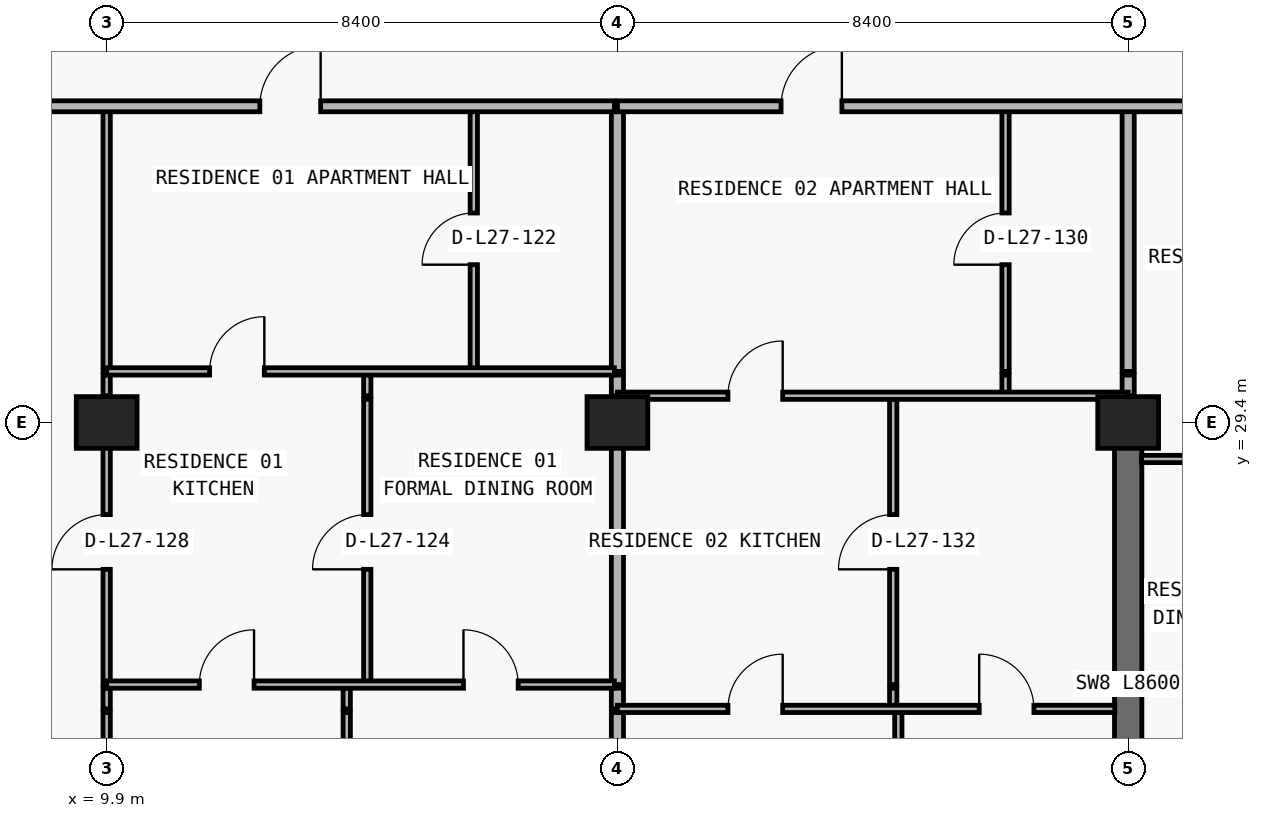
"""IFC4 building model, lengths in metres.
Left out: names, types, materials, properties, quantities, classifications, styles, units other than length and angle.
Written with IfcOpenShell. Run it as: python <this file> out.ifc"""

import sys

from ifc_helpers import new_model, si_unit, direction, frame, frame_2d, origin, origin_2d, place, context, subcontext, project, spatial, rectangle, extrude, element, fill, save


model = new_model("IFC4")
c1 = context("Model", 3, precision=1e-05, world=origin(), true_north=direction((0.0, 1.0)))
c2 = subcontext(c1, "Body", "Model", "MODEL_VIEW")
j1 = project(units=[si_unit("LENGTHUNIT", "METRE"), si_unit("PLANEANGLEUNIT", "RADIAN")], contexts=[c1])
p1 = place(None, origin())
s1 = spatial("IfcSite", under=j1, at=p1, CompositionType="ELEMENT")
p2 = place(p1, origin())
s2 = spatial("IfcBuilding", under=s1, at=p2, CompositionType="ELEMENT")
p3 = place(p2, frame((0.0, 0.0, 102.6)))
s3 = spatial("IfcBuildingStorey", under=s2, at=p3, CompositionType="ELEMENT", Elevation=102.6)
for number, where, z_axis, x_axis in (
    (1, (9.9, 29.4, 0.0), (0.0, 0.0, 1.0), (1.0, 0.0, 0.0)),
    (2, (18.3, 29.4, 0.0), (0.0, 0.0, 1.0), (1.0, 0.0, 0.0)),
    (3, (26.7, 29.4, 0.0), (0.0, 0.0, 1.0), (1.0, 0.0, 0.0)),
):
    element("IfcColumn", number, at=place(p3, frame(where, z_axis=z_axis, x_axis=x_axis)), inside=s3, PredefinedType="COLUMN", context=c2, shape_type="SweptSolid", body=[
        extrude(rectangle(XDim=1.0, YDim=0.85, at=origin_2d()), origin(), (0.0, 0.0, 1.0), 3.05),
    ])
p4 = place(p3, frame((26.7, 20.8, 0.0), z_axis=(0.0, 0.0, 1.0), x_axis=(0.0, 1.0, 0.0)))
e4 = element("IfcWall", 4, at=p4, inside=s3, PredefinedType="SHEAR", context=c2, shape_type="SweptSolid", body=[
    extrude(rectangle(XDim=8.6, YDim=0.45, at=frame_2d((4.3, 0.0))), origin(), (0.0, 0.0, 1.0), 3.05),
])
p5 = place(p3, frame((9.9, 8.84, 0.0), z_axis=(0.0, 0.0, 1.0), x_axis=(0.0, 1.0, 0.0)))
e5 = element("IfcWall", 5, at=p5, inside=s3, PredefinedType="PARTITIONING", context=c2, shape_type="SweptSolid", body=[
    extrude(rectangle(XDim=15.79, YDim=0.12, at=frame_2d((7.895, 0.0))), origin(), (0.0, 0.0, 1.0), 2.174),
])
p6 = place(p3, frame((9.9, 24.69, 0.0), z_axis=(0.0, 0.0, 1.0), x_axis=(0.0, 1.0, 0.0)))
e6 = element("IfcWall", 6, at=p6, inside=s3, PredefinedType="PARTITIONING", context=c2, shape_type="SweptSolid", body=[
    extrude(rectangle(XDim=0.34, YDim=0.12, at=frame_2d((0.17, 0.0))), origin(), (0.0, 0.0, 1.0), 2.174),
])
p7 = place(p3, frame((9.9, 25.09, 0.0), z_axis=(0.0, 0.0, 1.0), x_axis=(0.0, 1.0, 0.0)))
e7 = element("IfcWall", 7, at=p7, inside=s3, PredefinedType="PARTITIONING", context=c2, shape_type="SweptSolid", body=[
    extrude(rectangle(XDim=4.69, YDim=0.12, at=frame_2d((2.345, 0.0))), origin(), (0.0, 0.0, 1.0), 2.174),
])
p8 = place(p7, frame((1.895, 0.0, 0.0)))
e8 = element("IfcOpeningElement", 8, at=p8, cuts=e7, PredefinedType="OPENING", context=c2, shape_type="SweptSolid", body=[
    extrude(rectangle(XDim=0.9, YDim=2.124, at=frame_2d((0.45, 1.062))), frame((0.0, 0.07, 0.0), z_axis=(0.0, -1.0, 0.0), x_axis=(1.0, 0.0, 0.0)), (0.0, 0.0, 1.0), 0.14),
])
p9 = place(p3, frame((9.9, 29.84, 0.0), z_axis=(0.0, 0.0, 1.0), x_axis=(0.0, 1.0, 0.0)))
e9 = element("IfcWall", 9, at=p9, inside=s3, PredefinedType="PARTITIONING", context=c2, shape_type="SweptSolid", body=[
    extrude(rectangle(XDim=0.34, YDim=0.12, at=frame_2d((0.17, 0.0))), origin(), (0.0, 0.0, 1.0), 2.174),
])
p10 = place(p3, frame((9.9, 30.24, 0.0), z_axis=(0.0, 0.0, 1.0), x_axis=(0.0, 1.0, 0.0)))
e10 = element("IfcWall", 10, at=p10, inside=s3, PredefinedType="PARTITIONING", context=c2, shape_type="SweptSolid", body=[
    extrude(rectangle(XDim=4.36, YDim=0.12, at=frame_2d((2.18, 0.0))), origin(), (0.0, 0.0, 1.0), 2.174),
])
p11 = place(p3, frame((13.848, 8.84, 0.0), z_axis=(0.0, 0.0, 1.0), x_axis=(0.0, 1.0, 0.0)))
e11 = element("IfcWall", 11, at=p11, inside=s3, PredefinedType="PARTITIONING", context=c2, shape_type="SweptSolid", body=[
    extrude(rectangle(XDim=15.79, YDim=0.12, at=frame_2d((7.895, 0.0))), origin(), (0.0, 0.0, 1.0), 3.05),
])
p12 = place(p3, frame((13.848, 24.69, 0.0), z_axis=(0.0, 0.0, 1.0), x_axis=(0.0, 1.0, 0.0)))
e12 = element("IfcWall", 12, at=p12, inside=s3, PredefinedType="PARTITIONING", context=c2, shape_type="SweptSolid", body=[
    extrude(rectangle(XDim=0.34, YDim=0.12, at=frame_2d((0.17, 0.0))), origin(), (0.0, 0.0, 1.0), 3.05),
])
p13 = place(p3, frame((14.186, 25.09, 0.0), z_axis=(0.0, 0.0, 1.0), x_axis=(0.0, 1.0, 0.0)))
e13 = element("IfcWall", 13, at=p13, inside=s3, PredefinedType="PARTITIONING", context=c2, shape_type="SweptSolid", body=[
    extrude(rectangle(XDim=4.69, YDim=0.12, at=frame_2d((2.345, 0.0))), origin(), (0.0, 0.0, 1.0), 3.05),
])
p14 = place(p13, frame((1.895, 0.0, 0.0)))
e14 = element("IfcOpeningElement", 14, at=p14, cuts=e13, PredefinedType="OPENING", context=c2, shape_type="SweptSolid", body=[
    extrude(rectangle(XDim=0.9, YDim=2.15, at=frame_2d((0.45, 1.075))), frame((0.0, 0.07, 0.0), z_axis=(0.0, -1.0, 0.0), x_axis=(1.0, 0.0, 0.0)), (0.0, 0.0, 1.0), 0.14),
])
p15 = place(p3, frame((14.186, 29.84, 0.0), z_axis=(0.0, 0.0, 1.0), x_axis=(0.0, 1.0, 0.0)))
e15 = element("IfcWall", 15, at=p15, inside=s3, PredefinedType="PARTITIONING", context=c2, shape_type="SweptSolid", body=[
    extrude(rectangle(XDim=0.34, YDim=0.12, at=frame_2d((0.17, 0.0))), origin(), (0.0, 0.0, 1.0), 3.05),
])
p16 = place(p3, frame((15.938, 30.24, 0.0), z_axis=(0.0, 0.0, 1.0), x_axis=(0.0, 1.0, 0.0)))
e16 = element("IfcWall", 16, at=p16, inside=s3, PredefinedType="PARTITIONING", context=c2, shape_type="SweptSolid", body=[
    extrude(rectangle(XDim=4.36, YDim=0.12, at=frame_2d((2.18, 0.0))), origin(), (0.0, 0.0, 1.0), 3.05),
])
p17 = place(p16, frame((1.755, 0.0, 0.0)))
e17 = element("IfcOpeningElement", 17, at=p17, cuts=e16, PredefinedType="OPENING", context=c2, shape_type="SweptSolid", body=[
    extrude(rectangle(XDim=0.85, YDim=2.1, at=frame_2d((0.425, 1.05))), frame((0.0, 0.07, 0.0), z_axis=(0.0, -1.0, 0.0), x_axis=(1.0, 0.0, 0.0)), (0.0, 0.0, 1.0), 0.14),
])
p18 = place(p3, frame((18.3, 8.84, 0.0), z_axis=(0.0, 0.0, 1.0), x_axis=(0.0, 1.0, 0.0)))
e18 = element("IfcWall", 18, at=p18, inside=s3, PredefinedType="PARTITIONING", context=c2, shape_type="SweptSolid", body=[
    extrude(rectangle(XDim=15.79, YDim=0.2, at=frame_2d((7.895, 0.0))), origin(), (0.0, 0.0, 1.0), 2.174),
])
p19 = place(p3, frame((18.3, 24.69, 0.0), z_axis=(0.0, 0.0, 1.0), x_axis=(0.0, 1.0, 0.0)))
e19 = element("IfcWall", 19, at=p19, inside=s3, PredefinedType="PARTITIONING", context=c2, shape_type="SweptSolid", body=[
    extrude(rectangle(XDim=0.34, YDim=0.2, at=frame_2d((0.17, 0.0))), origin(), (0.0, 0.0, 1.0), 2.174),
])
p20 = place(p3, frame((18.3, 25.09, 0.0), z_axis=(0.0, 0.0, 1.0), x_axis=(0.0, 1.0, 0.0)))
e20 = element("IfcWall", 20, at=p20, inside=s3, PredefinedType="PARTITIONING", context=c2, shape_type="SweptSolid", body=[
    extrude(rectangle(XDim=4.69, YDim=0.2, at=frame_2d((2.345, 0.0))), origin(), (0.0, 0.0, 1.0), 2.174),
])
p21 = place(p3, frame((18.3, 29.84, 0.0), z_axis=(0.0, 0.0, 1.0), x_axis=(0.0, 1.0, 0.0)))
e21 = element("IfcWall", 21, at=p21, inside=s3, PredefinedType="PARTITIONING", context=c2, shape_type="SweptSolid", body=[
    extrude(rectangle(XDim=0.34, YDim=0.2, at=frame_2d((0.17, 0.0))), origin(), (0.0, 0.0, 1.0), 2.174),
])
p22 = place(p3, frame((18.3, 30.24, 0.0), z_axis=(0.0, 0.0, 1.0), x_axis=(0.0, 1.0, 0.0)))
e22 = element("IfcWall", 22, at=p22, inside=s3, PredefinedType="PARTITIONING", context=c2, shape_type="SweptSolid", body=[
    extrude(rectangle(XDim=4.36, YDim=0.2, at=frame_2d((2.18, 0.0))), origin(), (0.0, 0.0, 1.0), 2.174),
])
p23 = place(p3, frame((22.836, 24.69, 0.0), z_axis=(0.0, 0.0, 1.0), x_axis=(0.0, 1.0, 0.0)))
e23 = element("IfcWall", 23, at=p23, inside=s3, PredefinedType="PARTITIONING", context=c2, shape_type="SweptSolid", body=[
    extrude(rectangle(XDim=0.34, YDim=0.12, at=frame_2d((0.17, 0.0))), origin(), (0.0, 0.0, 1.0), 3.05),
])
p24 = place(p3, frame((22.836, 25.09, 0.0), z_axis=(0.0, 0.0, 1.0), x_axis=(0.0, 1.0, 0.0)))
e24 = element("IfcWall", 24, at=p24, inside=s3, PredefinedType="PARTITIONING", context=c2, shape_type="SweptSolid", body=[
    extrude(rectangle(XDim=4.69, YDim=0.12, at=frame_2d((2.345, 0.0))), origin(), (0.0, 0.0, 1.0), 3.05),
])
p25 = place(p24, frame((1.895, 0.0, 0.0)))
e25 = element("IfcOpeningElement", 25, at=p25, cuts=e24, PredefinedType="OPENING", context=c2, shape_type="SweptSolid", body=[
    extrude(rectangle(XDim=0.9, YDim=2.15, at=frame_2d((0.45, 1.075))), frame((0.0, 0.07, 0.0), z_axis=(0.0, -1.0, 0.0), x_axis=(1.0, 0.0, 0.0)), (0.0, 0.0, 1.0), 0.14),
])
p26 = place(p3, frame((22.92, 8.84, 0.0), z_axis=(0.0, 0.0, 1.0), x_axis=(0.0, 1.0, 0.0)))
e26 = element("IfcWall", 26, at=p26, inside=s3, PredefinedType="PARTITIONING", context=c2, shape_type="SweptSolid", body=[
    extrude(rectangle(XDim=15.79, YDim=0.12, at=frame_2d((7.895, 0.0))), origin(), (0.0, 0.0, 1.0), 3.05),
])
p27 = place(p3, frame((24.683, 29.84, 0.0), z_axis=(0.0, 0.0, 1.0), x_axis=(0.0, 1.0, 0.0)))
e27 = element("IfcWall", 27, at=p27, inside=s3, PredefinedType="PARTITIONING", context=c2, shape_type="SweptSolid", body=[
    extrude(rectangle(XDim=0.34, YDim=0.12, at=frame_2d((0.17, 0.0))), origin(), (0.0, 0.0, 1.0), 3.05),
])
p28 = place(p3, frame((24.683, 30.24, 0.0), z_axis=(0.0, 0.0, 1.0), x_axis=(0.0, 1.0, 0.0)))
e28 = element("IfcWall", 28, at=p28, inside=s3, PredefinedType="PARTITIONING", context=c2, shape_type="SweptSolid", body=[
    extrude(rectangle(XDim=4.36, YDim=0.12, at=frame_2d((2.18, 0.0))), origin(), (0.0, 0.0, 1.0), 3.05),
])
p29 = place(p28, frame((1.755, 0.0, 0.0)))
e29 = element("IfcOpeningElement", 29, at=p29, cuts=e28, PredefinedType="OPENING", context=c2, shape_type="SweptSolid", body=[
    extrude(rectangle(XDim=0.85, YDim=2.1, at=frame_2d((0.425, 1.05))), frame((0.0, 0.07, 0.0), z_axis=(0.0, -1.0, 0.0), x_axis=(1.0, 0.0, 0.0)), (0.0, 0.0, 1.0), 0.14),
])
p30 = place(p3, frame((26.7, 29.405, 0.0), z_axis=(0.0, 0.0, 1.0), x_axis=(0.0, 1.0, 0.0)))
e30 = element("IfcWall", 30, at=p30, inside=s3, PredefinedType="PARTITIONING", context=c2, shape_type="SweptSolid", body=[
    extrude(rectangle(XDim=0.375, YDim=0.2, at=frame_2d((0.188, 0.0))), origin(), (0.0, 0.0, 1.0), 3.05),
])
p31 = place(p3, frame((26.7, 29.84, 0.0), z_axis=(0.0, 0.0, 1.0), x_axis=(0.0, 1.0, 0.0)))
e31 = element("IfcWall", 31, at=p31, inside=s3, PredefinedType="PARTITIONING", context=c2, shape_type="SweptSolid", body=[
    extrude(rectangle(XDim=0.34, YDim=0.2, at=frame_2d((0.17, 0.0))), origin(), (0.0, 0.0, 1.0), 2.335),
])
p32 = place(p3, frame((26.7, 30.24, 0.0), z_axis=(0.0, 0.0, 1.0), x_axis=(0.0, 1.0, 0.0)))
e32 = element("IfcWall", 32, at=p32, inside=s3, PredefinedType="PARTITIONING", context=c2, shape_type="SweptSolid", body=[
    extrude(rectangle(XDim=4.36, YDim=0.2, at=frame_2d((2.18, 0.0))), origin(), (0.0, 0.0, 1.0), 2.335),
])
p33 = place(p3, frame((18.3, 24.69, 0.0), z_axis=(0.0, 0.0, 1.0), x_axis=(1.0, 0.0, 0.0)))
e33 = element("IfcWall", 33, at=p33, inside=s3, PredefinedType="PARTITIONING", context=c2, shape_type="SweptSolid", body=[
    extrude(rectangle(XDim=8.18, YDim=0.12, at=frame_2d((4.09, 0.0))), origin(), (0.0, 0.0, 1.0), 3.05),
])
p34 = place(p33, frame((1.818, 0.0, 0.0)))
e34 = element("IfcOpeningElement", 34, at=p34, cuts=e33, PredefinedType="OPENING", context=c2, shape_type="SweptSolid", body=[
    extrude(rectangle(XDim=0.9, YDim=2.15, at=frame_2d((0.45, 1.075))), frame((0.0, 0.07, 0.0), z_axis=(0.0, -1.0, 0.0), x_axis=(1.0, 0.0, 0.0)), (0.0, 0.0, 1.0), 0.14),
])
p35 = place(p33, frame((5.95, 0.0, 0.0)))
e35 = element("IfcOpeningElement", 35, at=p35, cuts=e33, PredefinedType="OPENING", context=c2, shape_type="SweptSolid", body=[
    extrude(rectangle(XDim=0.9, YDim=2.15, at=frame_2d((0.45, 1.075))), frame((0.0, 0.07, 0.0), z_axis=(0.0, -1.0, 0.0), x_axis=(1.0, 0.0, 0.0)), (0.0, 0.0, 1.0), 0.14),
])
p36 = place(p3, frame((9.9, 25.09, 0.0), z_axis=(0.0, 0.0, 1.0), x_axis=(1.0, 0.0, 0.0)))
e36 = element("IfcWall", 36, at=p36, inside=s3, PredefinedType="PARTITIONING", context=c2, shape_type="SweptSolid", body=[
    extrude(rectangle(XDim=8.35, YDim=0.12, at=frame_2d((4.175, 0.0))), origin(), (0.0, 0.0, 1.0), 3.05),
])
p37 = place(p36, frame((1.524, 0.0, 0.0)))
e37 = element("IfcOpeningElement", 37, at=p37, cuts=e36, PredefinedType="OPENING", context=c2, shape_type="SweptSolid", body=[
    extrude(rectangle(XDim=0.9, YDim=2.15, at=frame_2d((0.45, 1.075))), frame((0.0, 0.07, 0.0), z_axis=(0.0, -1.0, 0.0), x_axis=(1.0, 0.0, 0.0)), (0.0, 0.0, 1.0), 0.14),
])
p38 = place(p36, frame((5.868, 0.0, 0.0)))
e38 = element("IfcOpeningElement", 38, at=p38, cuts=e36, PredefinedType="OPENING", context=c2, shape_type="SweptSolid", body=[
    extrude(rectangle(XDim=0.9, YDim=2.15, at=frame_2d((0.45, 1.075))), frame((0.0, 0.07, 0.0), z_axis=(0.0, -1.0, 0.0), x_axis=(1.0, 0.0, 0.0)), (0.0, 0.0, 1.0), 0.14),
])
p39 = place(p3, frame((26.92, 28.8, 0.0), z_axis=(0.0, 0.0, 1.0), x_axis=(1.0, 0.0, 0.0)))
e39 = element("IfcWall", 39, at=p39, inside=s3, PredefinedType="PARTITIONING", context=c2, shape_type="SweptSolid", body=[
    extrude(rectangle(XDim=8.175, YDim=0.12, at=frame_2d((4.087, 0.0))), origin(), (0.0, 0.0, 1.0), 3.05),
])
p40 = place(p39, frame((1.33, 0.0, 0.0)))
e40 = element("IfcOpeningElement", 40, at=p40, cuts=e39, PredefinedType="OPENING", context=c2, shape_type="SweptSolid", body=[
    extrude(rectangle(XDim=0.9, YDim=2.15, at=frame_2d((0.45, 1.075))), frame((0.0, 0.07, 0.0), z_axis=(0.0, -1.0, 0.0), x_axis=(1.0, 0.0, 0.0)), (0.0, 0.0, 1.0), 0.14),
])
p41 = place(p3, frame((18.3, 29.84, 0.0), z_axis=(0.0, 0.0, 1.0), x_axis=(1.0, 0.0, 0.0)))
e41 = element("IfcWall", 41, at=p41, inside=s3, PredefinedType="PARTITIONING", context=c2, shape_type="SweptSolid", body=[
    extrude(rectangle(XDim=8.4, YDim=0.12, at=frame_2d((4.2, 0.0))), origin(), (0.0, 0.0, 1.0), 3.05),
])
p42 = place(p41, frame((1.818, 0.0, 0.0)))
e42 = element("IfcOpeningElement", 42, at=p42, cuts=e41, PredefinedType="OPENING", context=c2, shape_type="SweptSolid", body=[
    extrude(rectangle(XDim=0.9, YDim=2.15, at=frame_2d((0.45, 1.075))), frame((0.0, 0.07, 0.0), z_axis=(0.0, -1.0, 0.0), x_axis=(1.0, 0.0, 0.0)), (0.0, 0.0, 1.0), 0.14),
])
p43 = place(p3, frame((9.9, 30.24, 0.0), z_axis=(0.0, 0.0, 1.0), x_axis=(1.0, 0.0, 0.0)))
e43 = element("IfcWall", 43, at=p43, inside=s3, PredefinedType="PARTITIONING", context=c2, shape_type="SweptSolid", body=[
    extrude(rectangle(XDim=8.35, YDim=0.12, at=frame_2d((4.175, 0.0))), origin(), (0.0, 0.0, 1.0), 3.05),
])
p44 = place(p43, frame((1.693, 0.0, 0.0)))
e44 = element("IfcOpeningElement", 44, at=p44, cuts=e43, PredefinedType="OPENING", context=c2, shape_type="SweptSolid", body=[
    extrude(rectangle(XDim=0.9, YDim=2.15, at=frame_2d((0.45, 1.075))), frame((0.0, 0.07, 0.0), z_axis=(0.0, -1.0, 0.0), x_axis=(1.0, 0.0, 0.0)), (0.0, 0.0, 1.0), 0.14),
])
p45 = place(p3, frame((7.705, 34.6, 0.0), z_axis=(0.0, 0.0, 1.0), x_axis=(1.0, 0.0, 0.0)))
e45 = element("IfcWall", 45, at=p45, inside=s3, PredefinedType="PARTITIONING", context=c2, shape_type="SweptSolid", body=[
    extrude(rectangle(XDim=10.545, YDim=0.18, at=frame_2d((5.272, 0.0))), origin(), (0.0, 0.0, 1.0), 3.05),
])
p46 = place(p45, frame((4.714, 0.0, 0.0)))
e46 = element("IfcOpeningElement", 46, at=p46, cuts=e45, PredefinedType="OPENING", context=c2, shape_type="SweptSolid", body=[
    extrude(rectangle(XDim=1.0, YDim=2.2, at=frame_2d((0.5, 1.1))), frame((0.0, 0.1, 0.0), z_axis=(0.0, -1.0, 0.0), x_axis=(1.0, 0.0, 0.0)), (0.0, 0.0, 1.0), 0.2),
])
p47 = place(p3, frame((18.3, 34.6, 0.0), z_axis=(0.0, 0.0, 1.0), x_axis=(1.0, 0.0, 0.0)))
e47 = element("IfcWall", 47, at=p47, inside=s3, PredefinedType="PARTITIONING", context=c2, shape_type="SweptSolid", body=[
    extrude(rectangle(XDim=41.2, YDim=0.18, at=frame_2d((20.6, 0.0))), origin(), (0.0, 0.0, 1.0), 3.05),
])
p48 = place(p47, frame((2.691, 0.0, 0.0)))
e48 = element("IfcOpeningElement", 48, at=p48, cuts=e47, PredefinedType="OPENING", context=c2, shape_type="SweptSolid", body=[
    extrude(rectangle(XDim=1.0, YDim=2.2, at=frame_2d((0.5, 1.1))), frame((0.0, 0.1, 0.0), z_axis=(0.0, -1.0, 0.0), x_axis=(1.0, 0.0, 0.0)), (0.0, 0.0, 1.0), 0.2),
])
p49 = place(p47, frame((11.212, 0.0, 0.0)))
e49 = element("IfcOpeningElement", 49, at=p49, cuts=e47, PredefinedType="OPENING", context=c2, shape_type="SweptSolid", body=[
    extrude(rectangle(XDim=1.0, YDim=2.2, at=frame_2d((0.5, 1.1))), frame((0.0, 0.1, 0.0), z_axis=(0.0, -1.0, 0.0), x_axis=(1.0, 0.0, 0.0)), (0.0, 0.0, 1.0), 0.2),
])
p50 = place(p47, frame((35.504, 0.0, 0.0)))
e50 = element("IfcOpeningElement", 50, at=p50, cuts=e47, PredefinedType="OPENING", context=c2, shape_type="SweptSolid", body=[
    extrude(rectangle(XDim=1.0, YDim=2.2, at=frame_2d((0.5, 1.1))), frame((0.0, 0.1, 0.0), z_axis=(0.0, -1.0, 0.0), x_axis=(1.0, 0.0, 0.0)), (0.0, 0.0, 1.0), 0.2),
])
p51 = place(p46, origin())
e51 = element("IfcDoor", 51, at=p51, inside=s3, OperationType="SINGLE_SWING_RIGHT", PredefinedType="DOOR", context=c2, shape_type="SweptSolid", body=[
    extrude(rectangle(XDim=1.0, YDim=2.2, at=frame_2d((0.5, 1.1))), frame((0.0, 0.025, 0.0), z_axis=(0.0, -1.0, 0.0), x_axis=(1.0, 0.0, 0.0)), (0.0, 0.0, 1.0), 0.05),
])
fill(e46, e51)
p52 = place(p17, origin())
e52 = element("IfcDoor", 52, at=p52, inside=s3, OperationType="SINGLE_SWING_LEFT", PredefinedType="DOOR", context=c2, shape_type="SweptSolid", body=[
    extrude(rectangle(XDim=0.85, YDim=2.1, at=frame_2d((0.425, 1.05))), frame((0.0, 0.025, 0.0), z_axis=(0.0, -1.0, 0.0), x_axis=(1.0, 0.0, 0.0)), (0.0, 0.0, 1.0), 0.05),
])
fill(e17, e52)
p53 = place(p44, origin())
e53 = element("IfcDoor", 53, at=p53, inside=s3, OperationType="SINGLE_SWING_RIGHT", PredefinedType="DOOR", context=c2, shape_type="SweptSolid", body=[
    extrude(rectangle(XDim=0.9, YDim=2.15, at=frame_2d((0.45, 1.075))), frame((0.0, 0.025, 0.0), z_axis=(0.0, -1.0, 0.0), x_axis=(1.0, 0.0, 0.0)), (0.0, 0.0, 1.0), 0.05),
])
fill(e44, e53)
p54 = place(p14, origin())
e54 = element("IfcDoor", 54, at=p54, inside=s3, OperationType="SINGLE_SWING_LEFT", PredefinedType="DOOR", context=c2, shape_type="SweptSolid", body=[
    extrude(rectangle(XDim=0.9, YDim=2.15, at=frame_2d((0.45, 1.075))), frame((0.0, 0.025, 0.0), z_axis=(0.0, -1.0, 0.0), x_axis=(1.0, 0.0, 0.0)), (0.0, 0.0, 1.0), 0.05),
])
fill(e14, e54)
p55 = place(p37, origin())
e55 = element("IfcDoor", 55, at=p55, inside=s3, OperationType="SINGLE_SWING_RIGHT", PredefinedType="DOOR", context=c2, shape_type="SweptSolid", body=[
    extrude(rectangle(XDim=0.9, YDim=2.15, at=frame_2d((0.45, 1.075))), frame((0.0, 0.025, 0.0), z_axis=(0.0, -1.0, 0.0), x_axis=(1.0, 0.0, 0.0)), (0.0, 0.0, 1.0), 0.05),
])
fill(e37, e55)
p56 = place(p38, origin())
e56 = element("IfcDoor", 56, at=p56, inside=s3, OperationType="SINGLE_SWING_LEFT", PredefinedType="DOOR", context=c2, shape_type="SweptSolid", body=[
    extrude(rectangle(XDim=0.9, YDim=2.15, at=frame_2d((0.45, 1.075))), frame((0.0, 0.025, 0.0), z_axis=(0.0, -1.0, 0.0), x_axis=(1.0, 0.0, 0.0)), (0.0, 0.0, 1.0), 0.05),
])
fill(e38, e56)
p57 = place(p8, origin())
e57 = element("IfcDoor", 57, at=p57, inside=s3, OperationType="SINGLE_SWING_LEFT", PredefinedType="DOOR", context=c2, shape_type="SweptSolid", body=[
    extrude(rectangle(XDim=0.9, YDim=2.124, at=frame_2d((0.45, 1.062))), frame((0.0, 0.025, 0.0), z_axis=(0.0, -1.0, 0.0), x_axis=(1.0, 0.0, 0.0)), (0.0, 0.0, 1.0), 0.05),
])
fill(e8, e57)
p58 = place(p48, origin())
e58 = element("IfcDoor", 58, at=p58, inside=s3, OperationType="SINGLE_SWING_RIGHT", PredefinedType="DOOR", context=c2, shape_type="SweptSolid", body=[
    extrude(rectangle(XDim=1.0, YDim=2.2, at=frame_2d((0.5, 1.1))), frame((0.0, 0.025, 0.0), z_axis=(0.0, -1.0, 0.0), x_axis=(1.0, 0.0, 0.0)), (0.0, 0.0, 1.0), 0.05),
])
fill(e48, e58)
p59 = place(p29, origin())
e59 = element("IfcDoor", 59, at=p59, inside=s3, OperationType="SINGLE_SWING_LEFT", PredefinedType="DOOR", context=c2, shape_type="SweptSolid", body=[
    extrude(rectangle(XDim=0.85, YDim=2.1, at=frame_2d((0.425, 1.05))), frame((0.0, 0.025, 0.0), z_axis=(0.0, -1.0, 0.0), x_axis=(1.0, 0.0, 0.0)), (0.0, 0.0, 1.0), 0.05),
])
fill(e29, e59)
p60 = place(p42, origin())
e60 = element("IfcDoor", 60, at=p60, inside=s3, OperationType="SINGLE_SWING_RIGHT", PredefinedType="DOOR", context=c2, shape_type="SweptSolid", body=[
    extrude(rectangle(XDim=0.9, YDim=2.15, at=frame_2d((0.45, 1.075))), frame((0.0, 0.025, 0.0), z_axis=(0.0, -1.0, 0.0), x_axis=(1.0, 0.0, 0.0)), (0.0, 0.0, 1.0), 0.05),
])
fill(e42, e60)
p61 = place(p25, origin())
e61 = element("IfcDoor", 61, at=p61, inside=s3, OperationType="SINGLE_SWING_LEFT", PredefinedType="DOOR", context=c2, shape_type="SweptSolid", body=[
    extrude(rectangle(XDim=0.9, YDim=2.15, at=frame_2d((0.45, 1.075))), frame((0.0, 0.025, 0.0), z_axis=(0.0, -1.0, 0.0), x_axis=(1.0, 0.0, 0.0)), (0.0, 0.0, 1.0), 0.05),
])
fill(e25, e61)
p62 = place(p34, origin())
e62 = element("IfcDoor", 62, at=p62, inside=s3, OperationType="SINGLE_SWING_RIGHT", PredefinedType="DOOR", context=c2, shape_type="SweptSolid", body=[
    extrude(rectangle(XDim=0.9, YDim=2.15, at=frame_2d((0.45, 1.075))), frame((0.0, 0.025, 0.0), z_axis=(0.0, -1.0, 0.0), x_axis=(1.0, 0.0, 0.0)), (0.0, 0.0, 1.0), 0.05),
])
fill(e34, e62)
p63 = place(p35, origin())
e63 = element("IfcDoor", 63, at=p63, inside=s3, OperationType="SINGLE_SWING_LEFT", PredefinedType="DOOR", context=c2, shape_type="SweptSolid", body=[
    extrude(rectangle(XDim=0.9, YDim=2.15, at=frame_2d((0.45, 1.075))), frame((0.0, 0.025, 0.0), z_axis=(0.0, -1.0, 0.0), x_axis=(1.0, 0.0, 0.0)), (0.0, 0.0, 1.0), 0.05),
])
fill(e35, e63)
save(model, sys.argv[1])
